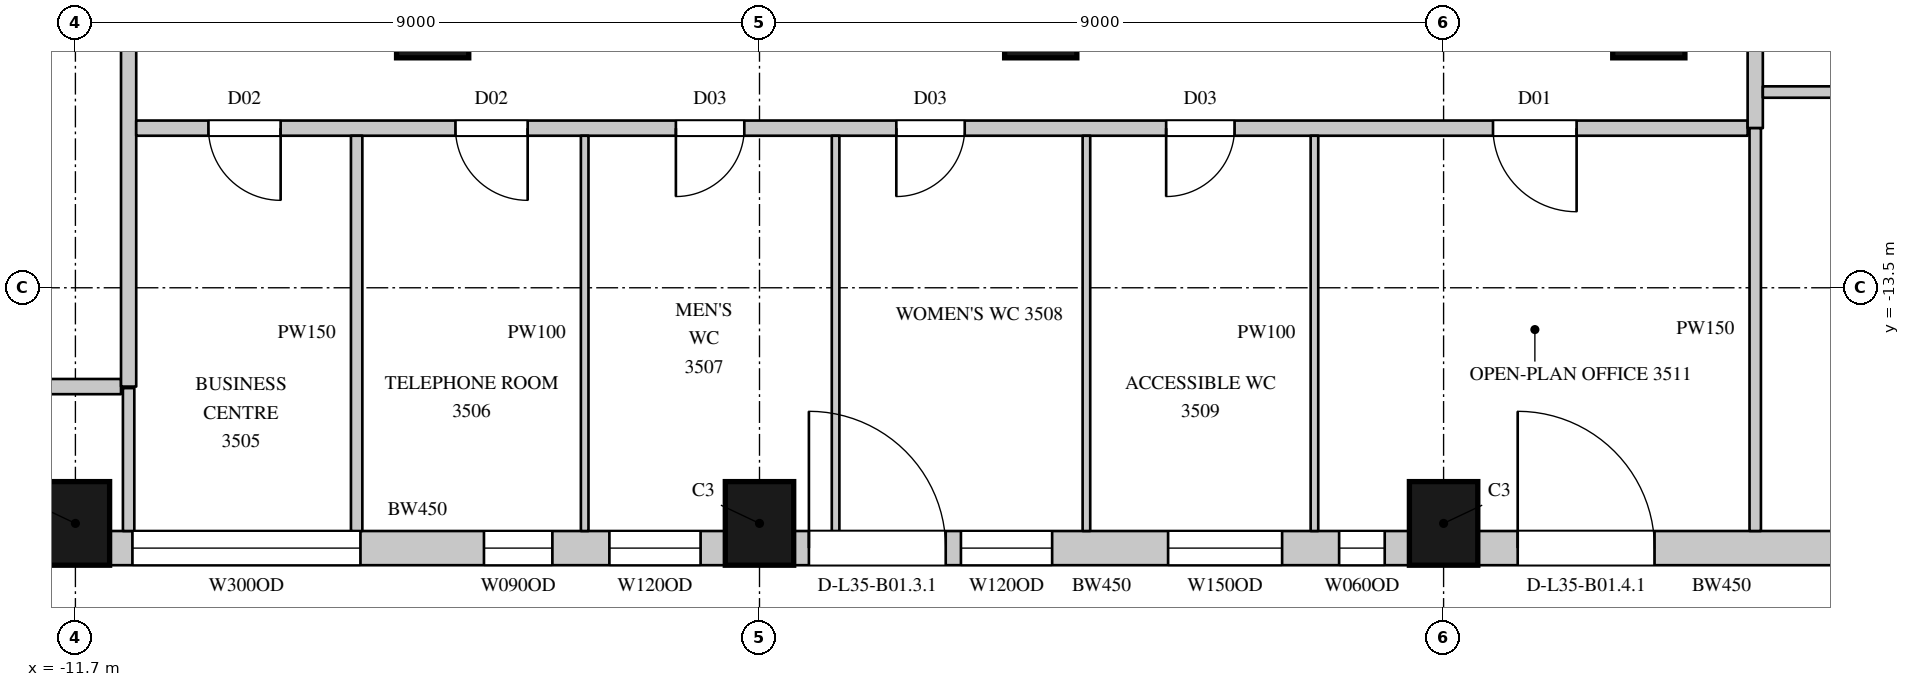
"""IFC4 building model, lengths in metres.
Left out: names, types, materials, properties, quantities, classifications, styles, units other than length and angle.
Written with IfcOpenShell. Run it as: python <this file> out.ifc"""

import sys

from ifc_helpers import new_model, si_unit, direction, frame, frame_2d, origin, origin_2d, place, context, subcontext, project, spatial, rectangle, circle, extrude, element, fill, save


model = new_model("IFC4")
c1 = context("Model", 3, precision=1e-05, world=origin(), true_north=direction((0.0, 1.0)))
c2 = subcontext(c1, "Body", "Model", "MODEL_VIEW")
j1 = project(units=[si_unit("LENGTHUNIT", "METRE"), si_unit("PLANEANGLEUNIT", "RADIAN")], contexts=[c1])
p1 = place(None, origin())
s1 = spatial("IfcSite", under=j1, at=p1, CompositionType="ELEMENT")
p2 = place(p1, origin())
s2 = spatial("IfcBuilding", under=s1, at=p2, CompositionType="ELEMENT")
p3 = place(p2, frame((0.0, 0.0, 164.6)))
s3 = spatial("IfcBuildingStorey", under=s2, at=p3, CompositionType="ELEMENT", Elevation=164.6)
for number, where, z_axis, x_axis in (
    (1, (-11.7, -16.6, 0.0), (0.0, 0.0, 1.0), (1.0, 0.0, 0.0)),
    (2, (-2.7, -16.6, 0.0), (0.0, 0.0, 1.0), (1.0, 0.0, 0.0)),
    (3, (6.3, -16.6, 0.0), (0.0, 0.0, 1.0), (1.0, 0.0, 0.0)),
):
    element("IfcColumn", number, at=place(p3, frame(where, z_axis=z_axis, x_axis=x_axis)), inside=s3, PredefinedType="COLUMN", context=c2, shape_type="SweptSolid", body=[
        extrude(rectangle(XDim=0.9, YDim=1.1, at=origin_2d()), origin(), (0.0, 0.0, 1.0), 4.1),
    ])
for number, where, z_axis, x_axis in (
    (4, (-7.0, -10.0, 0.0), (0.0, 0.0, 1.0), (1.0, 0.0, 0.0)),
    (5, (1.0, -10.0, 0.0), (0.0, 0.0, 1.0), (1.0, 0.0, 0.0)),
    (6, (9.0, -10.0, 0.0), (0.0, 0.0, 1.0), (1.0, 0.0, 0.0)),
):
    element("IfcColumn", number, at=place(p3, frame(where, z_axis=z_axis, x_axis=x_axis)), inside=s3, PredefinedType="COLUMN", context=c2, shape_type="SweptSolid", body=[
        extrude(circle(Radius=0.475, at=origin_2d()), origin(), (0.0, 0.0, 1.0), 4.1),
    ])
p4 = place(p3, frame((-11.25, -16.925, 0.0), z_axis=(0.0, 0.0, 1.0), x_axis=(1.0, 0.0, 0.0)))
e7 = element("IfcWall", 7, at=p4, inside=s3, PredefinedType="SOLIDWALL", context=c2, shape_type="SweptSolid", body=[
    extrude(rectangle(XDim=8.1, YDim=0.45, at=frame_2d((4.05, 0.0))), origin(), (0.0, 0.0, 1.0), 3.8),
])
p5 = place(p4, frame((0.3, 0.0, 1.05)))
e8 = element("IfcOpeningElement", 8, at=p5, cuts=e7, PredefinedType="OPENING", context=c2, shape_type="SweptSolid", body=[
    extrude(rectangle(XDim=3.0, YDim=2.4, at=frame_2d((1.5, 1.2))), frame((0.0, 0.235, 0.0), z_axis=(0.0, -1.0, 0.0), x_axis=(1.0, 0.0, 0.0)), (0.0, 0.0, 1.0), 0.47),
])
p6 = place(p4, frame((4.925, 0.0, 1.05)))
e9 = element("IfcOpeningElement", 9, at=p6, cuts=e7, PredefinedType="OPENING", context=c2, shape_type="SweptSolid", body=[
    extrude(rectangle(XDim=0.9, YDim=2.4, at=frame_2d((0.45, 1.2))), frame((0.0, 0.235, 0.0), z_axis=(0.0, -1.0, 0.0), x_axis=(1.0, 0.0, 0.0)), (0.0, 0.0, 1.0), 0.47),
])
p7 = place(p4, frame((6.575, 0.0, 1.05)))
e10 = element("IfcOpeningElement", 10, at=p7, cuts=e7, PredefinedType="OPENING", context=c2, shape_type="SweptSolid", body=[
    extrude(rectangle(XDim=1.2, YDim=2.4, at=frame_2d((0.6, 1.2))), frame((0.0, 0.235, 0.0), z_axis=(0.0, -1.0, 0.0), x_axis=(1.0, 0.0, 0.0)), (0.0, 0.0, 1.0), 0.47),
])
p8 = place(p3, frame((-2.25, -16.925, 0.0), z_axis=(0.0, 0.0, 1.0), x_axis=(1.0, 0.0, 0.0)))
e11 = element("IfcWall", 11, at=p8, inside=s3, PredefinedType="SOLIDWALL", context=c2, shape_type="SweptSolid", body=[
    extrude(rectangle(XDim=8.1, YDim=0.45, at=frame_2d((4.05, 0.0))), origin(), (0.0, 0.0, 1.0), 3.8),
])
p9 = place(p8, frame((0.2, 0.0, 0.0)))
e12 = element("IfcOpeningElement", 12, at=p9, cuts=e11, PredefinedType="OPENING", context=c2, shape_type="SweptSolid", body=[
    extrude(rectangle(XDim=1.8, YDim=2.4, at=frame_2d((0.9, 1.2))), frame((0.0, 0.235, 0.0), z_axis=(0.0, -1.0, 0.0), x_axis=(1.0, 0.0, 0.0)), (0.0, 0.0, 1.0), 0.47),
])
p10 = place(p8, frame((2.2, 0.0, 1.05)))
e13 = element("IfcOpeningElement", 13, at=p10, cuts=e11, PredefinedType="OPENING", context=c2, shape_type="SweptSolid", body=[
    extrude(rectangle(XDim=1.2, YDim=2.4, at=frame_2d((0.6, 1.2))), frame((0.0, 0.235, 0.0), z_axis=(0.0, -1.0, 0.0), x_axis=(1.0, 0.0, 0.0)), (0.0, 0.0, 1.0), 0.47),
])
p11 = place(p8, frame((4.926, 0.0, 1.05)))
e14 = element("IfcOpeningElement", 14, at=p11, cuts=e11, PredefinedType="OPENING", context=c2, shape_type="SweptSolid", body=[
    extrude(rectangle(XDim=1.5, YDim=2.4, at=frame_2d((0.75, 1.2))), frame((0.0, 0.235, 0.0), z_axis=(0.0, -1.0, 0.0), x_axis=(1.0, 0.0, 0.0)), (0.0, 0.0, 1.0), 0.47),
])
p12 = place(p8, frame((7.176, 0.0, 1.05)))
e15 = element("IfcOpeningElement", 15, at=p12, cuts=e11, PredefinedType="OPENING", context=c2, shape_type="SweptSolid", body=[
    extrude(rectangle(XDim=0.6, YDim=2.4, at=frame_2d((0.3, 1.2))), frame((0.0, 0.235, 0.0), z_axis=(0.0, -1.0, 0.0), x_axis=(1.0, 0.0, 0.0)), (0.0, 0.0, 1.0), 0.47),
])
p13 = place(p3, frame((6.75, -16.925, 0.0), z_axis=(0.0, 0.0, 1.0), x_axis=(1.0, 0.0, 0.0)))
e16 = element("IfcWall", 16, at=p13, inside=s3, PredefinedType="SOLIDWALL", context=c2, shape_type="SweptSolid", body=[
    extrude(rectangle(XDim=6.414, YDim=0.45, at=frame_2d((3.207, 0.0))), origin(), (0.0, 0.0, 1.0), 3.8),
])
p14 = place(p13, frame((0.525, 0.0, 0.0)))
e17 = element("IfcOpeningElement", 17, at=p14, cuts=e16, PredefinedType="OPENING", context=c2, shape_type="SweptSolid", body=[
    extrude(rectangle(XDim=1.8, YDim=2.4, at=frame_2d((0.9, 1.2))), frame((0.0, 0.235, 0.0), z_axis=(0.0, -1.0, 0.0), x_axis=(1.0, 0.0, 0.0)), (0.0, 0.0, 1.0), 0.47),
])
p15 = place(p3, frame((-13.97, -14.8, 0.0), z_axis=(0.0, 0.0, 1.0), x_axis=(1.0, 0.0, 0.0)))
e18 = element("IfcWall", 18, at=p15, inside=s3, PredefinedType="PARTITIONING", context=c2, shape_type="SweptSolid", body=[
    extrude(rectangle(XDim=2.87, YDim=0.2, at=frame_2d((1.435, 0.0))), origin(), (0.0, 0.0, 1.0), 3.8),
])
p16 = place(p3, frame((-11.0, -14.8, 0.0), z_axis=(0.0, 0.0, 1.0), x_axis=(0.0, 1.0, 0.0)))
e19 = element("IfcWall", 19, at=p16, inside=s3, PredefinedType="PARTITIONING", context=c2, shape_type="SweptSolid", body=[
    extrude(rectangle(XDim=29.6, YDim=0.2, at=frame_2d((14.8, 0.0))), origin(), (0.0, 0.0, 1.0), 3.8),
])
p17 = place(p16, frame((19.25, 0.0, 0.0)))
e20 = element("IfcOpeningElement", 20, at=p17, cuts=e19, PredefinedType="OPENING", context=c2, shape_type="SweptSolid", body=[
    extrude(rectangle(XDim=1.5, YDim=2.4, at=frame_2d((0.75, 1.2))), frame((0.0, 0.11, 0.0), z_axis=(0.0, -1.0, 0.0), x_axis=(1.0, 0.0, 0.0)), (0.0, 0.0, 1.0), 0.22),
])
p18 = place(p3, frame((-10.9, -11.4, 0.0), z_axis=(0.0, 0.0, 1.0), x_axis=(1.0, 0.0, 0.0)))
e21 = element("IfcWall", 21, at=p18, inside=s3, PredefinedType="PARTITIONING", context=c2, shape_type="SweptSolid", body=[
    extrude(rectangle(XDim=21.2, YDim=0.2, at=frame_2d((10.6, 0.0))), origin(), (0.0, 0.0, 1.0), 3.8),
])
p19 = place(p18, frame((0.95, 0.0, 0.0)))
e22 = element("IfcOpeningElement", 22, at=p19, cuts=e21, PredefinedType="OPENING", context=c2, shape_type="SweptSolid", body=[
    extrude(rectangle(XDim=0.95, YDim=2.2, at=frame_2d((0.475, 1.1))), frame((0.0, 0.11, 0.0), z_axis=(0.0, -1.0, 0.0), x_axis=(1.0, 0.0, 0.0)), (0.0, 0.0, 1.0), 0.22),
])
p20 = place(p18, frame((4.2, 0.0, 0.0)))
e23 = element("IfcOpeningElement", 23, at=p20, cuts=e21, PredefinedType="OPENING", context=c2, shape_type="SweptSolid", body=[
    extrude(rectangle(XDim=0.95, YDim=2.2, at=frame_2d((0.475, 1.1))), frame((0.0, 0.11, 0.0), z_axis=(0.0, -1.0, 0.0), x_axis=(1.0, 0.0, 0.0)), (0.0, 0.0, 1.0), 0.22),
])
p21 = place(p18, frame((7.1, 0.0, 0.0)))
e24 = element("IfcOpeningElement", 24, at=p21, cuts=e21, PredefinedType="OPENING", context=c2, shape_type="SweptSolid", body=[
    extrude(rectangle(XDim=0.9, YDim=2.2, at=frame_2d((0.45, 1.1))), frame((0.0, 0.11, 0.0), z_axis=(0.0, -1.0, 0.0), x_axis=(1.0, 0.0, 0.0)), (0.0, 0.0, 1.0), 0.22),
])
p22 = place(p18, frame((10.0, 0.0, 0.0)))
e25 = element("IfcOpeningElement", 25, at=p22, cuts=e21, PredefinedType="OPENING", context=c2, shape_type="SweptSolid", body=[
    extrude(rectangle(XDim=0.9, YDim=2.2, at=frame_2d((0.45, 1.1))), frame((0.0, 0.11, 0.0), z_axis=(0.0, -1.0, 0.0), x_axis=(1.0, 0.0, 0.0)), (0.0, 0.0, 1.0), 0.22),
])
p23 = place(p18, frame((13.55, 0.0, 0.0)))
e26 = element("IfcOpeningElement", 26, at=p23, cuts=e21, PredefinedType="OPENING", context=c2, shape_type="SweptSolid", body=[
    extrude(rectangle(XDim=0.9, YDim=2.2, at=frame_2d((0.45, 1.1))), frame((0.0, 0.11, 0.0), z_axis=(0.0, -1.0, 0.0), x_axis=(1.0, 0.0, 0.0)), (0.0, 0.0, 1.0), 0.22),
])
p24 = place(p18, frame((17.85, 0.0, 0.0)))
e27 = element("IfcOpeningElement", 27, at=p24, cuts=e21, PredefinedType="OPENING", context=c2, shape_type="SweptSolid", body=[
    extrude(rectangle(XDim=1.1, YDim=2.4, at=frame_2d((0.55, 1.2))), frame((0.0, 0.11, 0.0), z_axis=(0.0, -1.0, 0.0), x_axis=(1.0, 0.0, 0.0)), (0.0, 0.0, 1.0), 0.22),
])
p25 = place(p3, frame((10.4, -11.4, 0.0), z_axis=(0.0, 0.0, 1.0), x_axis=(0.0, 1.0, 0.0)))
e28 = element("IfcWall", 28, at=p25, inside=s3, PredefinedType="PARTITIONING", context=c2, shape_type="SweptSolid", body=[
    extrude(rectangle(XDim=23.5, YDim=0.2, at=frame_2d((11.75, 0.0))), origin(), (0.0, 0.0, 1.0), 3.8),
])
p26 = place(p25, frame((12.1, 0.0, 0.0)))
e29 = element("IfcOpeningElement", 29, at=p26, cuts=e28, PredefinedType="OPENING", context=c2, shape_type="SweptSolid", body=[
    extrude(rectangle(XDim=1.5, YDim=2.4, at=frame_2d((0.75, 1.2))), frame((0.0, 0.11, 0.0), z_axis=(0.0, -1.0, 0.0), x_axis=(1.0, 0.0, 0.0)), (0.0, 0.0, 1.0), 0.22),
])
p27 = place(p25, frame((19.25, 0.0, 0.0)))
e30 = element("IfcOpeningElement", 30, at=p27, cuts=e28, PredefinedType="OPENING", context=c2, shape_type="SweptSolid", body=[
    extrude(rectangle(XDim=1.1, YDim=2.4, at=frame_2d((0.55, 1.2))), frame((0.0, 0.11, 0.0), z_axis=(0.0, -1.0, 0.0), x_axis=(1.0, 0.0, 0.0)), (0.0, 0.0, 1.0), 0.22),
])
p28 = place(p25, frame((4.45, 0.0, 0.0)))
e31 = element("IfcOpeningElement", 31, at=p28, cuts=e28, PredefinedType="OPENING", context=c2, shape_type="SweptSolid", body=[
    extrude(rectangle(XDim=1.1, YDim=2.4, at=frame_2d((0.55, 1.2))), frame((0.0, 0.11, 0.0), z_axis=(0.0, -1.0, 0.0), x_axis=(1.0, 0.0, 0.0)), (0.0, 0.0, 1.0), 0.22),
])
p29 = place(p3, frame((-11.0, -16.7, 0.0), z_axis=(0.0, 0.0, 1.0), x_axis=(0.0, 1.0, 0.0)))
e32 = element("IfcWall", 32, at=p29, inside=s3, PredefinedType="PARTITIONING", context=c2, shape_type="SweptSolid", body=[
    extrude(rectangle(XDim=1.88, YDim=0.15, at=frame_2d((0.94, 0.0))), origin(), (0.0, 0.0, 1.0), 3.8),
])
p30 = place(p3, frame((-8.0, -16.7, 0.0), z_axis=(0.0, 0.0, 1.0), x_axis=(0.0, 1.0, 0.0)))
e33 = element("IfcWall", 33, at=p30, inside=s3, PredefinedType="PARTITIONING", context=c2, shape_type="SweptSolid", body=[
    extrude(rectangle(XDim=5.2, YDim=0.15, at=frame_2d((2.6, 0.0))), origin(), (0.0, 0.0, 1.0), 3.8),
])
p31 = place(p3, frame((10.4, -16.7, 0.0), z_axis=(0.0, 0.0, 1.0), x_axis=(0.0, 1.0, 0.0)))
e34 = element("IfcWall", 34, at=p31, inside=s3, PredefinedType="PARTITIONING", context=c2, shape_type="SweptSolid", body=[
    extrude(rectangle(XDim=5.3, YDim=0.15, at=frame_2d((2.65, 0.0))), origin(), (0.0, 0.0, 1.0), 3.8),
])
p32 = place(p3, frame((10.5, -10.925, 0.0), z_axis=(0.0, 0.0, 1.0), x_axis=(1.0, 0.0, 0.0)))
e35 = element("IfcWall", 35, at=p32, inside=s3, PredefinedType="PARTITIONING", context=c2, shape_type="SweptSolid", body=[
    extrude(rectangle(XDim=2.606, YDim=0.15, at=frame_2d((1.303, 0.0))), origin(), (0.0, 0.0, 1.0), 3.8),
])
p33 = place(p32, frame((1.2, 0.0, 0.0)))
e36 = element("IfcOpeningElement", 36, at=p33, cuts=e35, PredefinedType="OPENING", context=c2, shape_type="SweptSolid", body=[
    extrude(rectangle(XDim=0.95, YDim=2.2, at=frame_2d((0.475, 1.1))), frame((0.0, 0.085, 0.0), z_axis=(0.0, -1.0, 0.0), x_axis=(1.0, 0.0, 0.0)), (0.0, 0.0, 1.0), 0.17),
])
for number, where, z_axis, x_axis in (
    (37, (-5.0, -16.7, 0.0), (0.0, 0.0, 1.0), (0.0, 1.0, 0.0)),
    (38, (-1.699, -16.7, 0.0), (0.0, 0.0, 1.0), (0.0, 1.0, 0.0)),
):
    element("IfcWall", number, at=place(p3, frame(where, z_axis=z_axis, x_axis=x_axis)), inside=s3, PredefinedType="PARTITIONING", context=c2, shape_type="SweptSolid", body=[
        extrude(rectangle(XDim=5.2, YDim=0.1, at=frame_2d((2.6, 0.0))), origin(), (0.0, 0.0, 1.0), 3.8),
    ])
p34 = place(p3, frame((1.601, -16.7, 0.0), z_axis=(0.0, 0.0, 1.0), x_axis=(0.0, 1.0, 0.0)))
e39 = element("IfcWall", 39, at=p34, inside=s3, PredefinedType="PARTITIONING", context=c2, shape_type="SweptSolid", body=[
    extrude(rectangle(XDim=5.2, YDim=0.1, at=frame_2d((2.6, 0.0))), origin(), (0.0, 0.0, 1.0), 3.15),
])
p35 = place(p3, frame((4.601, -16.7, 0.0), z_axis=(0.0, 0.0, 1.0), x_axis=(0.0, 1.0, 0.0)))
e40 = element("IfcWall", 40, at=p35, inside=s3, PredefinedType="PARTITIONING", context=c2, shape_type="SweptSolid", body=[
    extrude(rectangle(XDim=5.2, YDim=0.1, at=frame_2d((2.6, 0.0))), origin(), (0.0, 0.0, 1.0), 3.8),
])
p36 = place(p5, origin())
e41 = element("IfcWindow", 41, at=p36, inside=s3, PartitioningType="SINGLE_PANEL", PredefinedType="WINDOW", context=c2, shape_type="SweptSolid", body=[
    extrude(rectangle(XDim=3.0, YDim=2.4, at=frame_2d((1.5, 1.2))), frame((0.0, 0.135, 0.0), z_axis=(0.0, -1.0, 0.0), x_axis=(1.0, 0.0, 0.0)), (0.0, 0.0, 1.0), 0.06),
])
fill(e8, e41)
p37 = place(p9, origin())
e42 = element("IfcDoor", 42, at=p37, inside=s3, OperationType="SLIDING_TO_LEFT", PredefinedType="DOOR", context=c2, shape_type="SweptSolid", body=[
    extrude(rectangle(XDim=1.8, YDim=2.4, at=frame_2d((0.9, 1.2))), frame((0.0, 0.13, 0.0), z_axis=(0.0, -1.0, 0.0), x_axis=(1.0, 0.0, 0.0)), (0.0, 0.0, 1.0), 0.05),
])
fill(e12, e42)
p38 = place(p10, origin())
e43 = element("IfcWindow", 43, at=p38, inside=s3, PartitioningType="SINGLE_PANEL", PredefinedType="WINDOW", context=c2, shape_type="SweptSolid", body=[
    extrude(rectangle(XDim=1.2, YDim=2.4, at=frame_2d((0.6, 1.2))), frame((0.0, 0.135, 0.0), z_axis=(0.0, -1.0, 0.0), x_axis=(1.0, 0.0, 0.0)), (0.0, 0.0, 1.0), 0.06),
])
fill(e13, e43)
p39 = place(p14, origin())
e44 = element("IfcDoor", 44, at=p39, inside=s3, OperationType="SLIDING_TO_LEFT", PredefinedType="DOOR", context=c2, shape_type="SweptSolid", body=[
    extrude(rectangle(XDim=1.8, YDim=2.4, at=frame_2d((0.9, 1.2))), frame((0.0, 0.13, 0.0), z_axis=(0.0, -1.0, 0.0), x_axis=(1.0, 0.0, 0.0)), (0.0, 0.0, 1.0), 0.05),
])
fill(e17, e44)
p40 = place(p19, origin())
e45 = element("IfcDoor", 45, at=p40, inside=s3, OperationType="SINGLE_SWING_LEFT", PredefinedType="DOOR", context=c2, shape_type="SweptSolid", body=[
    extrude(rectangle(XDim=0.95, YDim=2.2, at=frame_2d((0.475, 1.1))), frame((0.0, 0.025, 0.0), z_axis=(0.0, -1.0, 0.0), x_axis=(1.0, 0.0, 0.0)), (0.0, 0.0, 1.0), 0.05),
])
fill(e22, e45)
p41 = place(p20, origin())
e46 = element("IfcDoor", 46, at=p41, inside=s3, OperationType="SINGLE_SWING_LEFT", PredefinedType="DOOR", context=c2, shape_type="SweptSolid", body=[
    extrude(rectangle(XDim=0.95, YDim=2.2, at=frame_2d((0.475, 1.1))), frame((0.0, 0.025, 0.0), z_axis=(0.0, -1.0, 0.0), x_axis=(1.0, 0.0, 0.0)), (0.0, 0.0, 1.0), 0.05),
])
fill(e23, e46)
p42 = place(p21, origin())
e47 = element("IfcDoor", 47, at=p42, inside=s3, OperationType="SINGLE_SWING_RIGHT", PredefinedType="DOOR", context=c2, shape_type="SweptSolid", body=[
    extrude(rectangle(XDim=0.9, YDim=2.2, at=frame_2d((0.45, 1.1))), frame((0.0, 0.025, 0.0), z_axis=(0.0, -1.0, 0.0), x_axis=(1.0, 0.0, 0.0)), (0.0, 0.0, 1.0), 0.05),
])
fill(e24, e47)
p43 = place(p22, origin())
e48 = element("IfcDoor", 48, at=p43, inside=s3, OperationType="SINGLE_SWING_RIGHT", PredefinedType="DOOR", context=c2, shape_type="SweptSolid", body=[
    extrude(rectangle(XDim=0.9, YDim=2.2, at=frame_2d((0.45, 1.1))), frame((0.0, 0.025, 0.0), z_axis=(0.0, -1.0, 0.0), x_axis=(1.0, 0.0, 0.0)), (0.0, 0.0, 1.0), 0.05),
])
fill(e25, e48)
p44 = place(p23, origin())
e49 = element("IfcDoor", 49, at=p44, inside=s3, OperationType="SINGLE_SWING_RIGHT", PredefinedType="DOOR", context=c2, shape_type="SweptSolid", body=[
    extrude(rectangle(XDim=0.9, YDim=2.2, at=frame_2d((0.45, 1.1))), frame((0.0, 0.025, 0.0), z_axis=(0.0, -1.0, 0.0), x_axis=(1.0, 0.0, 0.0)), (0.0, 0.0, 1.0), 0.05),
])
fill(e26, e49)
p45 = place(p24, origin())
e50 = element("IfcDoor", 50, at=p45, inside=s3, OperationType="SINGLE_SWING_LEFT", PredefinedType="DOOR", context=c2, shape_type="SweptSolid", body=[
    extrude(rectangle(XDim=1.1, YDim=2.4, at=frame_2d((0.55, 1.2))), frame((0.0, 0.025, 0.0), z_axis=(0.0, -1.0, 0.0), x_axis=(1.0, 0.0, 0.0)), (0.0, 0.0, 1.0), 0.05),
])
fill(e27, e50)
p46 = place(p6, origin())
e51 = element("IfcWindow", 51, at=p46, inside=s3, PartitioningType="SINGLE_PANEL", PredefinedType="WINDOW", context=c2, shape_type="SweptSolid", body=[
    extrude(rectangle(XDim=0.9, YDim=2.4, at=frame_2d((0.45, 1.2))), frame((0.0, 0.135, 0.0), z_axis=(0.0, -1.0, 0.0), x_axis=(1.0, 0.0, 0.0)), (0.0, 0.0, 1.0), 0.06),
])
fill(e9, e51)
p47 = place(p7, origin())
e52 = element("IfcWindow", 52, at=p47, inside=s3, PartitioningType="SINGLE_PANEL", PredefinedType="WINDOW", context=c2, shape_type="SweptSolid", body=[
    extrude(rectangle(XDim=1.2, YDim=2.4, at=frame_2d((0.6, 1.2))), frame((0.0, 0.135, 0.0), z_axis=(0.0, -1.0, 0.0), x_axis=(1.0, 0.0, 0.0)), (0.0, 0.0, 1.0), 0.06),
])
fill(e10, e52)
p48 = place(p11, origin())
e53 = element("IfcWindow", 53, at=p48, inside=s3, PartitioningType="SINGLE_PANEL", PredefinedType="WINDOW", context=c2, shape_type="SweptSolid", body=[
    extrude(rectangle(XDim=1.5, YDim=2.4, at=frame_2d((0.75, 1.2))), frame((0.0, 0.135, 0.0), z_axis=(0.0, -1.0, 0.0), x_axis=(1.0, 0.0, 0.0)), (0.0, 0.0, 1.0), 0.06),
])
fill(e14, e53)
p49 = place(p12, origin())
e54 = element("IfcWindow", 54, at=p49, inside=s3, PartitioningType="SINGLE_PANEL", PredefinedType="WINDOW", context=c2, shape_type="SweptSolid", body=[
    extrude(rectangle(XDim=0.6, YDim=2.4, at=frame_2d((0.3, 1.2))), frame((0.0, 0.135, 0.0), z_axis=(0.0, -1.0, 0.0), x_axis=(1.0, 0.0, 0.0)), (0.0, 0.0, 1.0), 0.06),
])
fill(e15, e54)
save(model, sys.argv[1])
